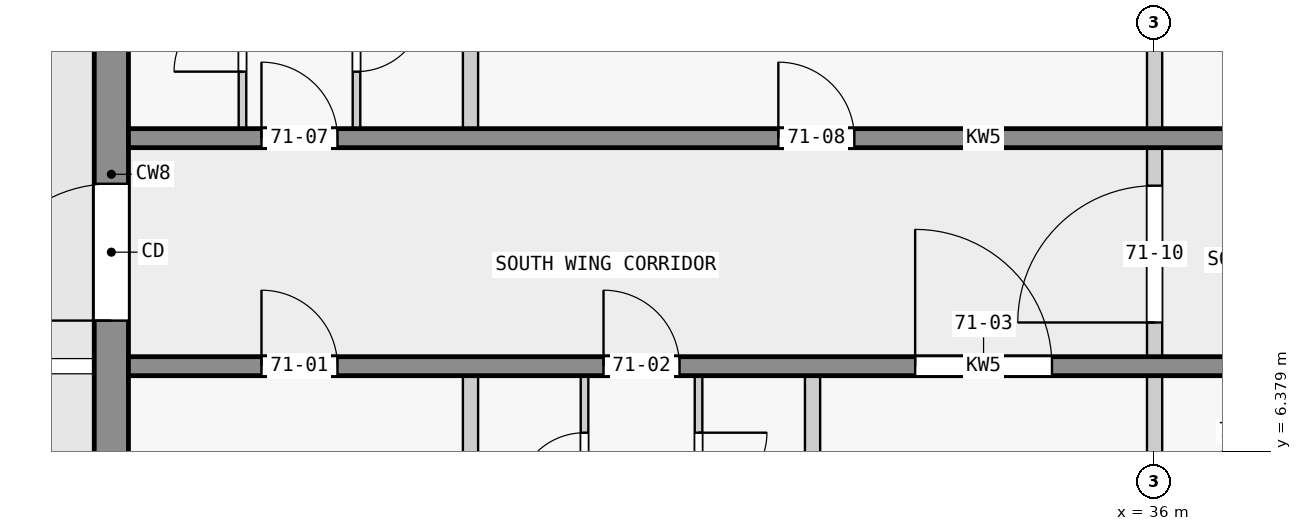
"""IFC4 building model, lengths in metres.
Left out: names, types, materials, properties, quantities, classifications, styles, units other than length and angle.
Written with IfcOpenShell. Run it as: python <this file> out.ifc"""

import sys

from ifc_helpers import new_model, si_unit, direction, frame, frame_2d, origin, place, context, subcontext, project, spatial, rectangle, extrude, element, fill, save


model = new_model("IFC4")
c1 = context("Model", 3, precision=1e-05, world=origin(), true_north=direction((0.0, 1.0)))
c2 = subcontext(c1, "Body", "Model", "MODEL_VIEW")
j1 = project(units=[si_unit("LENGTHUNIT", "METRE"), si_unit("PLANEANGLEUNIT", "RADIAN")], contexts=[c1])
p1 = place(None, origin())
s1 = spatial("IfcSite", under=j1, at=p1, CompositionType="ELEMENT")
p2 = place(p1, origin())
s2 = spatial("IfcBuilding", under=s1, at=p2, CompositionType="ELEMENT")
p3 = place(p2, frame((0.0, 0.0, 270.4)))
s3 = spatial("IfcBuildingStorey", under=s2, at=p3, CompositionType="ELEMENT", Elevation=270.4)
p4 = place(p3, frame((22.275, 2.5, 0.0), z_axis=(0.0, 0.0, 1.0), x_axis=(0.0, 1.0, 0.0)))
e1 = element("IfcWall", 1, at=p4, inside=s3, PredefinedType="SHEAR", context=c2, shape_type="SweptSolid", body=[
    extrude(rectangle(XDim=15.05, YDim=0.45, at=frame_2d((7.525, 0.0))), origin(), (0.0, 0.0, 1.0), 3.25),
])
p5 = place(p4, frame((5.6, 0.0, 0.0)))
e2 = element("IfcOpeningElement", 2, at=p5, cuts=e1, PredefinedType="OPENING", context=c2, shape_type="SweptSolid", body=[
    extrude(rectangle(XDim=1.8, YDim=2.1, at=frame_2d((0.9, 1.05))), frame((0.0, 0.235, 0.0), z_axis=(0.0, -1.0, 0.0), x_axis=(1.0, 0.0, 0.0)), (0.0, 0.0, 1.0), 0.47),
])
p6 = place(p3, frame((22.5, 7.5, 0.0), z_axis=(0.0, 0.0, 1.0), x_axis=(1.0, 0.0, 0.0)))
e3 = element("IfcWall", 3, at=p6, inside=s3, PredefinedType="SHEAR", context=c2, shape_type="SweptSolid", body=[
    extrude(rectangle(XDim=22.5, YDim=0.25, at=frame_2d((11.25, 0.0))), origin(), (0.0, 0.0, 1.0), 3.25),
])
p7 = place(p6, frame((1.75, 0.0, 0.0)))
e4 = element("IfcOpeningElement", 4, at=p7, cuts=e3, PredefinedType="OPENING", context=c2, shape_type="SweptSolid", body=[
    extrude(rectangle(XDim=1.0, YDim=2.1, at=frame_2d((0.5, 1.05))), frame((0.0, 0.135, 0.0), z_axis=(0.0, -1.0, 0.0), x_axis=(1.0, 0.0, 0.0)), (0.0, 0.0, 1.0), 0.27),
])
p8 = place(p6, frame((6.25, 0.0, 0.0)))
e5 = element("IfcOpeningElement", 5, at=p8, cuts=e3, PredefinedType="OPENING", context=c2, shape_type="SweptSolid", body=[
    extrude(rectangle(XDim=1.0, YDim=2.1, at=frame_2d((0.5, 1.05))), frame((0.0, 0.135, 0.0), z_axis=(0.0, -1.0, 0.0), x_axis=(1.0, 0.0, 0.0)), (0.0, 0.0, 1.0), 0.27),
])
p9 = place(p6, frame((10.35, 0.0, 0.0)))
e6 = element("IfcOpeningElement", 6, at=p9, cuts=e3, PredefinedType="OPENING", context=c2, shape_type="SweptSolid", body=[
    extrude(rectangle(XDim=1.8, YDim=2.1, at=frame_2d((0.9, 1.05))), frame((0.0, 0.135, 0.0), z_axis=(0.0, -1.0, 0.0), x_axis=(1.0, 0.0, 0.0)), (0.0, 0.0, 1.0), 0.27),
])
p10 = place(p6, frame((15.25, 0.0, 0.0)))
e7 = element("IfcOpeningElement", 7, at=p10, cuts=e3, PredefinedType="OPENING", context=c2, shape_type="SweptSolid", body=[
    extrude(rectangle(XDim=1.0, YDim=2.1, at=frame_2d((0.5, 1.05))), frame((0.0, 0.135, 0.0), z_axis=(0.0, -1.0, 0.0), x_axis=(1.0, 0.0, 0.0)), (0.0, 0.0, 1.0), 0.27),
])
p11 = place(p6, frame((18.75, 0.0, 0.0)))
e8 = element("IfcOpeningElement", 8, at=p11, cuts=e3, PredefinedType="OPENING", context=c2, shape_type="SweptSolid", body=[
    extrude(rectangle(XDim=0.9, YDim=2.1, at=frame_2d((0.45, 1.05))), frame((0.0, 0.135, 0.0), z_axis=(0.0, -1.0, 0.0), x_axis=(1.0, 0.0, 0.0)), (0.0, 0.0, 1.0), 0.27),
])
p12 = place(p6, frame((20.95, 0.0, 0.0)))
e9 = element("IfcOpeningElement", 9, at=p12, cuts=e3, PredefinedType="OPENING", context=c2, shape_type="SweptSolid", body=[
    extrude(rectangle(XDim=1.0, YDim=2.1, at=frame_2d((0.5, 1.05))), frame((0.0, 0.135, 0.0), z_axis=(0.0, -1.0, 0.0), x_axis=(1.0, 0.0, 0.0)), (0.0, 0.0, 1.0), 0.27),
])
p13 = place(p3, frame((22.5, 10.5, 0.0), z_axis=(0.0, 0.0, 1.0), x_axis=(1.0, 0.0, 0.0)))
e10 = element("IfcWall", 10, at=p13, inside=s3, PredefinedType="SHEAR", context=c2, shape_type="SweptSolid", body=[
    extrude(rectangle(XDim=22.5, YDim=0.25, at=frame_2d((11.25, 0.0))), origin(), (0.0, 0.0, 1.0), 3.25),
])
p14 = place(p13, frame((1.75, 0.0, 0.0)))
e11 = element("IfcOpeningElement", 11, at=p14, cuts=e10, PredefinedType="OPENING", context=c2, shape_type="SweptSolid", body=[
    extrude(rectangle(XDim=1.0, YDim=2.1, at=frame_2d((0.5, 1.05))), frame((0.0, 0.135, 0.0), z_axis=(0.0, -1.0, 0.0), x_axis=(1.0, 0.0, 0.0)), (0.0, 0.0, 1.0), 0.27),
])
p15 = place(p13, frame((8.55, 0.0, 0.0)))
e12 = element("IfcOpeningElement", 12, at=p15, cuts=e10, PredefinedType="OPENING", context=c2, shape_type="SweptSolid", body=[
    extrude(rectangle(XDim=1.0, YDim=2.1, at=frame_2d((0.5, 1.05))), frame((0.0, 0.135, 0.0), z_axis=(0.0, -1.0, 0.0), x_axis=(1.0, 0.0, 0.0)), (0.0, 0.0, 1.0), 0.27),
])
p16 = place(p13, frame((16.85, 0.0, 0.0)))
e13 = element("IfcOpeningElement", 13, at=p16, cuts=e10, PredefinedType="OPENING", context=c2, shape_type="SweptSolid", body=[
    extrude(rectangle(XDim=1.0, YDim=2.1, at=frame_2d((0.5, 1.05))), frame((0.0, 0.135, 0.0), z_axis=(0.0, -1.0, 0.0), x_axis=(1.0, 0.0, 0.0)), (0.0, 0.0, 1.0), 0.27),
])
p17 = place(p3, frame((24.0, 10.625, 0.0), z_axis=(0.0, 0.0, 1.0), x_axis=(0.0, 1.0, 0.0)))
e14 = element("IfcWall", 14, at=p17, inside=s3, PredefinedType="PARTITIONING", context=c2, shape_type="SweptSolid", body=[
    extrude(rectangle(XDim=2.4, YDim=0.1, at=frame_2d((1.2, 0.0))), origin(), (0.0, 0.0, 1.0), 3.25),
])
p18 = place(p17, frame((0.75, 0.0, 0.0)))
e15 = element("IfcOpeningElement", 15, at=p18, cuts=e14, PredefinedType="OPENING", context=c2, shape_type="SweptSolid", body=[
    extrude(rectangle(XDim=0.9, YDim=2.1, at=frame_2d((0.45, 1.05))), frame((0.0, 0.06, 0.0), z_axis=(0.0, -1.0, 0.0), x_axis=(1.0, 0.0, 0.0)), (0.0, 0.0, 1.0), 0.12),
])
p19 = place(p3, frame((25.5, 13.025, 0.0), z_axis=(0.0, 0.0, 1.0), x_axis=(0.0, -1.0, 0.0)))
e16 = element("IfcWall", 16, at=p19, inside=s3, PredefinedType="PARTITIONING", context=c2, shape_type="SweptSolid", body=[
    extrude(rectangle(XDim=2.4, YDim=0.1, at=frame_2d((1.2, 0.0))), origin(), (0.0, 0.0, 1.0), 3.25),
])
p20 = place(p19, frame((0.75, 0.0, 0.0)))
e17 = element("IfcOpeningElement", 17, at=p20, cuts=e16, PredefinedType="OPENING", context=c2, shape_type="SweptSolid", body=[
    extrude(rectangle(XDim=0.9, YDim=2.1, at=frame_2d((0.45, 1.05))), frame((0.0, 0.06, 0.0), z_axis=(0.0, -1.0, 0.0), x_axis=(1.0, 0.0, 0.0)), (0.0, 0.0, 1.0), 0.12),
])
p21 = place(p3, frame((27.0, 1.527, 0.0), z_axis=(0.0, 0.0, 1.0), x_axis=(0.0, 1.0, 0.0)))
e18 = element("IfcWall", 18, at=p21, inside=s3, PredefinedType="PARTITIONING", context=c2, shape_type="SweptSolid", body=[
    extrude(rectangle(XDim=5.848, YDim=0.2, at=frame_2d((2.924, 0.0))), origin(), (0.0, 0.0, 1.0), 3.25),
])
p22 = place(p3, frame((27.0, 10.625, 0.0), z_axis=(0.0, 0.0, 1.0), x_axis=(0.0, 1.0, 0.0)))
e19 = element("IfcWall", 19, at=p22, inside=s3, PredefinedType="PARTITIONING", context=c2, shape_type="SweptSolid", body=[
    extrude(rectangle(XDim=2.3, YDim=0.2, at=frame_2d((1.15, 0.0))), origin(), (0.0, 0.0, 1.0), 3.25),
])
p23 = place(p3, frame((28.5, 4.975, 0.0), z_axis=(0.0, 0.0, 1.0), x_axis=(0.0, 1.0, 0.0)))
e20 = element("IfcWall", 20, at=p23, inside=s3, PredefinedType="PARTITIONING", context=c2, shape_type="SweptSolid", body=[
    extrude(rectangle(XDim=2.4, YDim=0.1, at=frame_2d((1.2, 0.0))), origin(), (0.0, 0.0, 1.0), 3.25),
])
p24 = place(p23, frame((0.75, 0.0, 0.0)))
e21 = element("IfcOpeningElement", 21, at=p24, cuts=e20, PredefinedType="OPENING", context=c2, shape_type="SweptSolid", body=[
    extrude(rectangle(XDim=0.9, YDim=2.1, at=frame_2d((0.45, 1.05))), frame((0.0, 0.06, 0.0), z_axis=(0.0, -1.0, 0.0), x_axis=(1.0, 0.0, 0.0)), (0.0, 0.0, 1.0), 0.12),
])
p25 = place(p3, frame((30.0, 7.375, 0.0), z_axis=(0.0, 0.0, 1.0), x_axis=(0.0, -1.0, 0.0)))
e22 = element("IfcWall", 22, at=p25, inside=s3, PredefinedType="PARTITIONING", context=c2, shape_type="SweptSolid", body=[
    extrude(rectangle(XDim=2.4, YDim=0.1, at=frame_2d((1.2, 0.0))), origin(), (0.0, 0.0, 1.0), 3.25),
])
p26 = place(p25, frame((0.75, 0.0, 0.0)))
e23 = element("IfcOpeningElement", 23, at=p26, cuts=e22, PredefinedType="OPENING", context=c2, shape_type="SweptSolid", body=[
    extrude(rectangle(XDim=0.9, YDim=2.1, at=frame_2d((0.45, 1.05))), frame((0.0, 0.06, 0.0), z_axis=(0.0, -1.0, 0.0), x_axis=(1.0, 0.0, 0.0)), (0.0, 0.0, 1.0), 0.12),
])
p27 = place(p3, frame((31.5, 5.075, 0.0), z_axis=(0.0, 0.0, 1.0), x_axis=(0.0, 1.0, 0.0)))
e24 = element("IfcWall", 24, at=p27, inside=s3, PredefinedType="PARTITIONING", context=c2, shape_type="SweptSolid", body=[
    extrude(rectangle(XDim=2.3, YDim=0.2, at=frame_2d((1.15, 0.0))), origin(), (0.0, 0.0, 1.0), 3.25),
])
for number, where, z_axis, x_axis in (
    (25, (36.0, 1.4, 0.0), (0.0, 0.0, 1.0), (0.0, 1.0, 0.0)),
    (26, (36.0, 10.625, 0.0), (0.0, 0.0, 1.0), (0.0, 1.0, 0.0)),
):
    element("IfcWall", number, at=place(p3, frame(where, z_axis=z_axis, x_axis=x_axis)), inside=s3, PredefinedType="PARTITIONING", context=c2, shape_type="SweptSolid", body=[
        extrude(rectangle(XDim=5.975, YDim=0.2, at=frame_2d((2.988, 0.0))), origin(), (0.0, 0.0, 1.0), 3.25),
    ])
p28 = place(p3, frame((36.0, 7.475, 0.0), z_axis=(0.0, 0.0, 1.0), x_axis=(0.0, 1.0, 0.0)))
e27 = element("IfcWall", 27, at=p28, inside=s3, PredefinedType="PARTITIONING", context=c2, shape_type="SweptSolid", body=[
    extrude(rectangle(XDim=3.05, YDim=0.2, at=frame_2d((1.525, 0.0))), origin(), (0.0, 0.0, 1.0), 3.25),
])
p29 = place(p28, frame((0.6, 0.0, 0.0)))
e28 = element("IfcOpeningElement", 28, at=p29, cuts=e27, PredefinedType="OPENING", context=c2, shape_type="SweptSolid", body=[
    extrude(rectangle(XDim=1.8, YDim=2.1, at=frame_2d((0.9, 1.05))), frame((0.0, 0.11, 0.0), z_axis=(0.0, -1.0, 0.0), x_axis=(1.0, 0.0, 0.0)), (0.0, 0.0, 1.0), 0.22),
])
p30 = place(p5, origin())
e29 = element("IfcDoor", 29, at=p30, inside=s3, OperationType="DOUBLE_DOOR_SINGLE_SWING", PredefinedType="DOOR", context=c2, shape_type="SweptSolid", body=[
    extrude(rectangle(XDim=1.8, YDim=2.1, at=frame_2d((0.9, 1.05))), frame((0.0, 0.025, 0.0), z_axis=(0.0, -1.0, 0.0), x_axis=(1.0, 0.0, 0.0)), (0.0, 0.0, 1.0), 0.05),
])
fill(e2, e29)
p31 = place(p7, origin())
e30 = element("IfcDoor", 30, at=p31, inside=s3, OperationType="SINGLE_SWING_LEFT", PredefinedType="DOOR", context=c2, shape_type="SweptSolid", body=[
    extrude(rectangle(XDim=1.0, YDim=2.1, at=frame_2d((0.5, 1.05))), frame((0.0, 0.025, 0.0), z_axis=(0.0, -1.0, 0.0), x_axis=(1.0, 0.0, 0.0)), (0.0, 0.0, 1.0), 0.05),
])
fill(e4, e30)
p32 = place(p8, origin())
e31 = element("IfcDoor", 31, at=p32, inside=s3, OperationType="SINGLE_SWING_LEFT", PredefinedType="DOOR", context=c2, shape_type="SweptSolid", body=[
    extrude(rectangle(XDim=1.0, YDim=2.1, at=frame_2d((0.5, 1.05))), frame((0.0, 0.025, 0.0), z_axis=(0.0, -1.0, 0.0), x_axis=(1.0, 0.0, 0.0)), (0.0, 0.0, 1.0), 0.05),
])
fill(e5, e31)
p33 = place(p9, origin())
e32 = element("IfcDoor", 32, at=p33, inside=s3, OperationType="SINGLE_SWING_LEFT", PredefinedType="DOOR", context=c2, shape_type="SweptSolid", body=[
    extrude(rectangle(XDim=1.8, YDim=2.1, at=frame_2d((0.9, 1.05))), frame((0.0, 0.025, 0.0), z_axis=(0.0, -1.0, 0.0), x_axis=(1.0, 0.0, 0.0)), (0.0, 0.0, 1.0), 0.05),
])
fill(e6, e32)
p34 = place(p14, origin())
e33 = element("IfcDoor", 33, at=p34, inside=s3, OperationType="SINGLE_SWING_LEFT", PredefinedType="DOOR", context=c2, shape_type="SweptSolid", body=[
    extrude(rectangle(XDim=1.0, YDim=2.1, at=frame_2d((0.5, 1.05))), frame((0.0, 0.025, 0.0), z_axis=(0.0, -1.0, 0.0), x_axis=(1.0, 0.0, 0.0)), (0.0, 0.0, 1.0), 0.05),
])
fill(e11, e33)
p35 = place(p15, origin())
e34 = element("IfcDoor", 34, at=p35, inside=s3, OperationType="SINGLE_SWING_LEFT", PredefinedType="DOOR", context=c2, shape_type="SweptSolid", body=[
    extrude(rectangle(XDim=1.0, YDim=2.1, at=frame_2d((0.5, 1.05))), frame((0.0, 0.025, 0.0), z_axis=(0.0, -1.0, 0.0), x_axis=(1.0, 0.0, 0.0)), (0.0, 0.0, 1.0), 0.05),
])
fill(e12, e34)
p36 = place(p29, origin())
e35 = element("IfcDoor", 35, at=p36, inside=s3, OperationType="SINGLE_SWING_LEFT", PredefinedType="DOOR", context=c2, shape_type="SweptSolid", body=[
    extrude(rectangle(XDim=1.8, YDim=2.1, at=frame_2d((0.9, 1.05))), frame((0.0, 0.025, 0.0), z_axis=(0.0, -1.0, 0.0), x_axis=(1.0, 0.0, 0.0)), (0.0, 0.0, 1.0), 0.05),
])
fill(e28, e35)
p37 = place(p24, origin())
e36 = element("IfcDoor", 36, at=p37, inside=s3, OperationType="SINGLE_SWING_LEFT", PredefinedType="DOOR", context=c2, shape_type="SweptSolid", body=[
    extrude(rectangle(XDim=0.9, YDim=2.1, at=frame_2d((0.45, 1.05))), frame((0.0, 0.025, 0.0), z_axis=(0.0, -1.0, 0.0), x_axis=(1.0, 0.0, 0.0)), (0.0, 0.0, 1.0), 0.05),
])
fill(e21, e36)
p38 = place(p26, origin())
e37 = element("IfcDoor", 37, at=p38, inside=s3, OperationType="SINGLE_SWING_LEFT", PredefinedType="DOOR", context=c2, shape_type="SweptSolid", body=[
    extrude(rectangle(XDim=0.9, YDim=2.1, at=frame_2d((0.45, 1.05))), frame((0.0, 0.025, 0.0), z_axis=(0.0, -1.0, 0.0), x_axis=(1.0, 0.0, 0.0)), (0.0, 0.0, 1.0), 0.05),
])
fill(e23, e37)
p39 = place(p18, origin())
e38 = element("IfcDoor", 38, at=p39, inside=s3, OperationType="SINGLE_SWING_LEFT", PredefinedType="DOOR", context=c2, shape_type="SweptSolid", body=[
    extrude(rectangle(XDim=0.9, YDim=2.1, at=frame_2d((0.45, 1.05))), frame((0.0, 0.025, 0.0), z_axis=(0.0, -1.0, 0.0), x_axis=(1.0, 0.0, 0.0)), (0.0, 0.0, 1.0), 0.05),
])
fill(e15, e38)
p40 = place(p20, origin())
e39 = element("IfcDoor", 39, at=p40, inside=s3, OperationType="SINGLE_SWING_LEFT", PredefinedType="DOOR", context=c2, shape_type="SweptSolid", body=[
    extrude(rectangle(XDim=0.9, YDim=2.1, at=frame_2d((0.45, 1.05))), frame((0.0, 0.025, 0.0), z_axis=(0.0, -1.0, 0.0), x_axis=(1.0, 0.0, 0.0)), (0.0, 0.0, 1.0), 0.05),
])
fill(e17, e39)
save(model, sys.argv[1])
